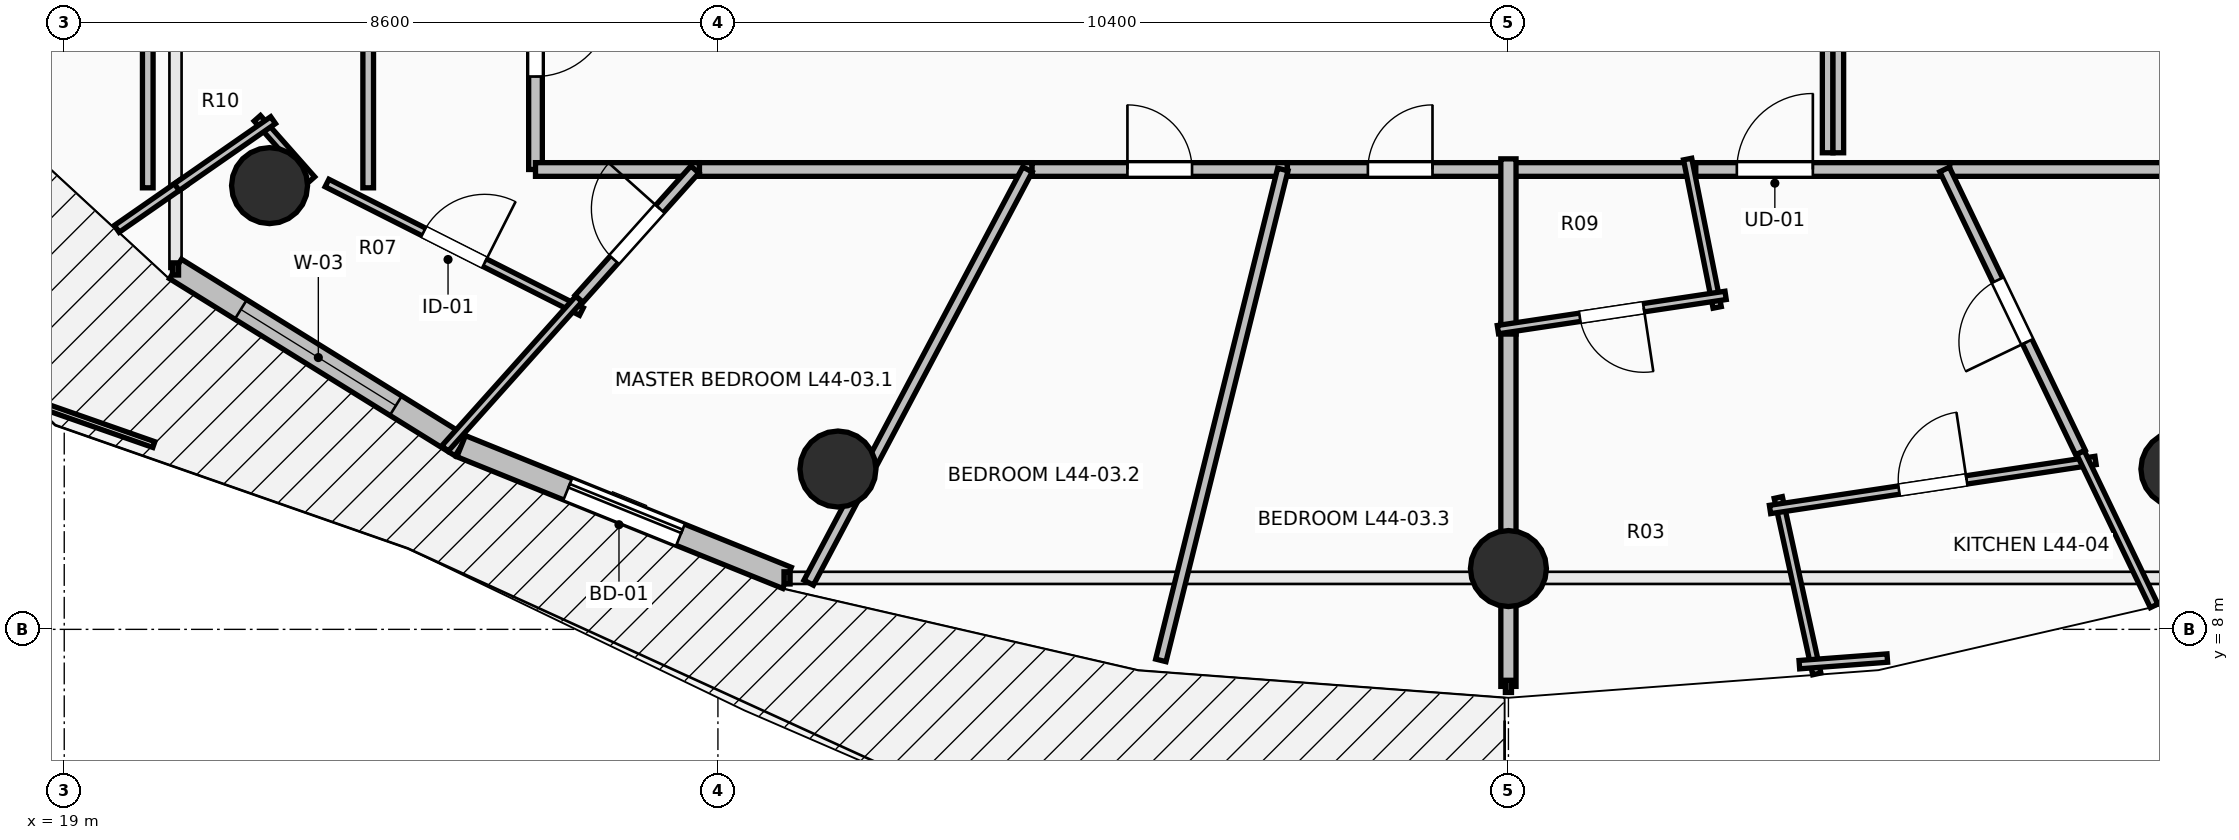
"""IFC4 building model, lengths in metres.
Left out: names, types, materials, properties, quantities, classifications, styles, units other than length and angle.
Written with IfcOpenShell. Run it as: python <this file> out.ifc"""

import sys

from ifc_helpers import new_model, si_unit, direction, frame, frame_2d, origin, origin_2d, place, context, subcontext, project, spatial, rectangle, circle, extrude, element, fill, save


model = new_model("IFC4")
c1 = context("Model", 3, precision=1e-05, world=origin(), true_north=direction((0.0, 1.0)))
c2 = subcontext(c1, "Body", "Model", "MODEL_VIEW")
j1 = project(units=[si_unit("LENGTHUNIT", "METRE"), si_unit("PLANEANGLEUNIT", "RADIAN")], contexts=[c1])
p1 = place(None, origin())
s1 = spatial("IfcSite", under=j1, at=p1, CompositionType="ELEMENT")
p2 = place(p1, origin())
s2 = spatial("IfcBuilding", under=s1, at=p2, CompositionType="ELEMENT")
p3 = place(p2, frame((0.0, 0.0, 164.1)))
s3 = spatial("IfcBuildingStorey", under=s2, at=p3, CompositionType="ELEMENT", Elevation=164.1)
for number, where, z_axis, x_axis in (
    (1, (21.701, 13.838, 0.0), (0.0, 0.0, 1.0), (-0.707, -0.707, 0.0)),
    (2, (29.179, 10.109, 0.0), (0.0, 0.0, 1.0), (-0.383, -0.924, 0.0)),
    (3, (38.0, 8.8, 0.0), (0.0, 0.0, 1.0), (0.0, -1.0, 0.0)),
    (4, (46.821, 10.109, 0.0), (0.0, 0.0, 1.0), (0.383, -0.924, 0.0)),
):
    element("IfcColumn", number, at=place(p3, frame(where, z_axis=z_axis, x_axis=x_axis)), inside=s3, PredefinedType="COLUMN", context=c2, shape_type="SweptSolid", body=[
        extrude(circle(Radius=0.5, at=origin_2d()), origin(), (0.0, 0.0, 1.0), 3.5),
    ])
p4 = place(p3, frame((20.464, 12.742, 0.0), z_axis=(0.0, 0.0, 1.0), x_axis=(0.849721181976, -0.527232313977, 0.0)))
e5 = element("IfcWall", 5, at=p4, inside=s3, PredefinedType="STANDARD", context=c2, shape_type="SweptSolid", body=[
    extrude(rectangle(XDim=4.423, YDim=0.3, at=frame_2d((2.211, 0.0))), origin(), (0.0, 0.0, 1.0), 3.24),
])
p5 = place(p4, frame((1.011, 0.0, 0.85)))
e6 = element("IfcOpeningElement", 6, at=p5, cuts=e5, PredefinedType="OPENING", context=c2, shape_type="SweptSolid", body=[
    extrude(rectangle(XDim=2.4, YDim=2.19, at=frame_2d((1.2, 1.095))), frame((0.0, 0.165, 0.0), z_axis=(0.0, -1.0, 0.0), x_axis=(1.0, 0.0, 0.0)), (0.0, 0.0, 1.0), 0.33),
])
p6 = place(p3, frame((24.222, 10.41, 0.0), z_axis=(0.0, 0.0, 1.0), x_axis=(0.927156504392, -0.374674280359, 0.0)))
e7 = element("IfcWall", 7, at=p6, inside=s3, PredefinedType="STANDARD", context=c2, shape_type="SweptSolid", body=[
    extrude(rectangle(XDim=4.625, YDim=0.3, at=frame_2d((2.312, 0.0))), origin(), (0.0, 0.0, 1.0), 3.24),
])
p7 = place(p6, frame((1.512, 0.0, 0.0)))
e8 = element("IfcOpeningElement", 8, at=p7, cuts=e7, PredefinedType="OPENING", context=c2, shape_type="SweptSolid", body=[
    extrude(rectangle(XDim=1.6, YDim=2.3, at=frame_2d((0.8, 1.15))), frame((0.0, 0.165, 0.0), z_axis=(0.0, -1.0, 0.0), x_axis=(1.0, 0.0, 0.0)), (0.0, 0.0, 1.0), 0.33),
])
p8 = place(p3, frame((25.2, 17.496, 0.0), z_axis=(0.0, 0.0, 1.0), x_axis=(0.0, -1.0, 0.0)))
e9 = element("IfcWall", 9, at=p8, inside=s3, PredefinedType="PARTITIONING", context=c2, shape_type="SweptSolid", body=[
    extrude(rectangle(XDim=3.446, YDim=0.18, at=frame_2d((1.723, 0.0))), origin(), (0.0, 0.0, 1.0), 2.432),
])
p9 = place(p8, frame((1.223, 0.0, 0.0)))
e10 = element("IfcOpeningElement", 10, at=p9, cuts=e9, PredefinedType="OPENING", context=c2, shape_type="SweptSolid", body=[
    extrude(rectangle(XDim=1.0, YDim=2.15, at=frame_2d((0.5, 1.075))), frame((0.0, 0.105, 0.0), z_axis=(0.0, -1.0, 0.0), x_axis=(1.0, 0.0, 0.0)), (0.0, 0.0, 1.0), 0.21),
])
p10 = place(p3, frame((25.2, 14.05, 0.0), z_axis=(0.0, 0.0, 1.0), x_axis=(1.0, 0.0, 0.0)))
e11 = element("IfcWall", 11, at=p10, inside=s3, PredefinedType="PARTITIONING", context=c2, shape_type="SweptSolid", body=[
    extrude(rectangle(XDim=2.157, YDim=0.18, at=frame_2d((1.079, 0.0))), origin(), (0.0, 0.0, 1.0), 2.886),
])
p11 = place(p3, frame((27.357, 14.05, 0.0), z_axis=(0.0, 0.0, 1.0), x_axis=(1.0, 0.0, 0.0)))
e12 = element("IfcWall", 12, at=p11, inside=s3, PredefinedType="PARTITIONING", context=c2, shape_type="SweptSolid", body=[
    extrude(rectangle(XDim=4.376, YDim=0.18, at=frame_2d((2.188, 0.0))), origin(), (0.0, 0.0, 1.0), 2.432),
])
p12 = place(p3, frame((31.733, 14.05, 0.0), z_axis=(0.0, 0.0, 1.0), x_axis=(1.0, 0.0, 0.0)))
e13 = element("IfcWall", 13, at=p12, inside=s3, PredefinedType="PARTITIONING", context=c2, shape_type="SweptSolid", body=[
    extrude(rectangle(XDim=3.359, YDim=0.18, at=frame_2d((1.68, 0.0))), origin(), (0.0, 0.0, 1.0), 2.929),
])
p13 = place(p12, frame((1.254, 0.0, 0.0)))
e14 = element("IfcOpeningElement", 14, at=p13, cuts=e13, PredefinedType="OPENING", context=c2, shape_type="SweptSolid", body=[
    extrude(rectangle(XDim=0.85, YDim=2.1, at=frame_2d((0.425, 1.05))), frame((0.0, 0.105, 0.0), z_axis=(0.0, -1.0, 0.0), x_axis=(1.0, 0.0, 0.0)), (0.0, 0.0, 1.0), 0.21),
])
p14 = place(p3, frame((35.092, 14.05, 0.0), z_axis=(0.0, 0.0, 1.0), x_axis=(1.0, 0.0, 0.0)))
e15 = element("IfcWall", 15, at=p14, inside=s3, PredefinedType="PARTITIONING", context=c2, shape_type="SweptSolid", body=[
    extrude(rectangle(XDim=2.968, YDim=0.18, at=frame_2d((1.484, 0.0))), origin(), (0.0, 0.0, 1.0), 2.929),
])
p15 = place(p14, frame((1.059, 0.0, 0.0)))
e16 = element("IfcOpeningElement", 16, at=p15, cuts=e15, PredefinedType="OPENING", context=c2, shape_type="SweptSolid", body=[
    extrude(rectangle(XDim=0.85, YDim=2.1, at=frame_2d((0.425, 1.05))), frame((0.0, 0.105, 0.0), z_axis=(0.0, -1.0, 0.0), x_axis=(1.0, 0.0, 0.0)), (0.0, 0.0, 1.0), 0.21),
])
p16 = place(p3, frame((40.325, 14.05, 0.0), z_axis=(0.0, 0.0, 1.0), x_axis=(1.0, 0.0, 0.0)))
e17 = element("IfcWall", 17, at=p16, inside=s3, PredefinedType="PARTITIONING", context=c2, shape_type="SweptSolid", body=[
    extrude(rectangle(XDim=3.48, YDim=0.18, at=frame_2d((1.74, 0.0))), origin(), (0.0, 0.0, 1.0), 3.24),
])
p17 = place(p16, frame((0.68, 0.0, 0.0)))
e18 = element("IfcOpeningElement", 18, at=p17, cuts=e17, PredefinedType="OPENING", context=c2, shape_type="SweptSolid", body=[
    extrude(rectangle(XDim=1.0, YDim=2.15, at=frame_2d((0.5, 1.075))), frame((0.0, 0.105, 0.0), z_axis=(0.0, -1.0, 0.0), x_axis=(1.0, 0.0, 0.0)), (0.0, 0.0, 1.0), 0.21),
])
p18 = place(p3, frame((37.92, 14.05, 0.0), z_axis=(0.0, 0.0, 1.0), x_axis=(1.0, 0.0, 0.0)))
e19 = element("IfcWall", 19, at=p18, inside=s3, PredefinedType="PARTITIONING", context=c2, shape_type="SweptSolid", body=[
    extrude(rectangle(XDim=2.545, YDim=0.18, at=frame_2d((1.272, 0.0))), origin(), (0.0, 0.0, 1.0), 2.929),
])
p19 = place(p3, frame((43.805, 14.05, 0.0), z_axis=(0.0, 0.0, 1.0), x_axis=(1.0, 0.0, 0.0)))
e20 = element("IfcWall", 20, at=p19, inside=s3, PredefinedType="PARTITIONING", context=c2, shape_type="SweptSolid", body=[
    extrude(rectangle(XDim=2.987, YDim=0.18, at=frame_2d((1.494, 0.0))), origin(), (0.0, 0.0, 1.0), 2.432),
])
p20 = place(p3, frame((22.457, 13.872, 0.0), z_axis=(0.0, 0.0, 1.0), x_axis=(0.892531160695, -0.450985728364, 0.0)))
e21 = element("IfcWall", 21, at=p20, inside=s3, PredefinedType="PARTITIONING", context=c2, shape_type="SweptSolid", body=[
    extrude(rectangle(XDim=3.75, YDim=0.11, at=frame_2d((1.875, 0.0))), origin(), (0.0, 0.0, 1.0), 3.24),
])
p21 = place(p20, frame((1.425, 0.0, 0.0)))
e22 = element("IfcOpeningElement", 22, at=p21, cuts=e21, PredefinedType="OPENING", context=c2, shape_type="SweptSolid", body=[
    extrude(rectangle(XDim=0.9, YDim=2.1, at=frame_2d((0.45, 1.05))), frame((0.0, 0.07, 0.0), z_axis=(0.0, -1.0, 0.0), x_axis=(1.0, 0.0, 0.0)), (0.0, 0.0, 1.0), 0.14),
])
p22 = place(p3, frame((25.772, 12.348, 0.0), z_axis=(0.0, 0.0, 1.0), x_axis=(-0.667094551448, -0.744973059532, 0.0)))
e23 = element("IfcWall", 23, at=p22, inside=s3, PredefinedType="PARTITIONING", context=c2, shape_type="SweptSolid", body=[
    extrude(rectangle(XDim=2.643, YDim=0.11, at=frame_2d((1.321, 0.0))), origin(), (0.0, 0.0, 1.0), 2.728),
])
p23 = place(p3, frame((19.691, 13.269, 0.0), z_axis=(0.0, 0.0, 1.0), x_axis=(0.821239462259, 0.57058368854, 0.0)))
e24 = element("IfcWall", 24, at=p23, inside=s3, PredefinedType="PARTITIONING", context=c2, shape_type="SweptSolid", body=[
    extrude(rectangle(XDim=1.071, YDim=0.11, at=frame_2d((0.536, 0.0))), origin(), (0.0, 0.0, 1.0), 3.24),
])
p24 = place(p3, frame((20.099, 13.809, 0.0), z_axis=(0.0, 0.0, 1.0), x_axis=(0.0, 1.0, 0.0)))
e25 = element("IfcWall", 25, at=p24, inside=s3, PredefinedType="PARTITIONING", context=c2, shape_type="SweptSolid", body=[
    extrude(rectangle(XDim=2.6, YDim=0.14, at=frame_2d((1.3, 0.0))), origin(), (0.0, 0.0, 1.0), 2.728),
])
p25 = place(p3, frame((22.999, 16.409, 0.0), z_axis=(0.0, 0.0, 1.0), x_axis=(0.0, -1.0, 0.0)))
e26 = element("IfcWall", 26, at=p25, inside=s3, PredefinedType="PARTITIONING", context=c2, shape_type="SweptSolid", body=[
    extrude(rectangle(XDim=2.6, YDim=0.14, at=frame_2d((1.3, 0.0))), origin(), (0.0, 0.0, 1.0), 2.432),
])
p26 = place(p3, frame((25.773, 12.348, 0.0), z_axis=(0.0, 0.0, 1.0), x_axis=(0.667197684579, 0.744880694939, 0.0)))
e27 = element("IfcWall", 27, at=p26, inside=s3, PredefinedType="PARTITIONING", context=c2, shape_type="SweptSolid", body=[
    extrude(rectangle(XDim=2.285, YDim=0.14, at=frame_2d((1.143, 0.0))), origin(), (0.0, 0.0, 1.0), 2.886),
])
p27 = place(p26, frame((0.692, 0.0, 0.0)))
e28 = element("IfcOpeningElement", 28, at=p27, cuts=e27, PredefinedType="OPENING", context=c2, shape_type="SweptSolid", body=[
    extrude(rectangle(XDim=0.9, YDim=2.1, at=frame_2d((0.45, 1.05))), frame((0.0, 0.085, 0.0), z_axis=(0.0, -1.0, 0.0), x_axis=(1.0, 0.0, 0.0)), (0.0, 0.0, 1.0), 0.17),
])
p28 = place(p3, frame((22.254, 13.917, 0.0), z_axis=(0.0, 0.0, 1.0), x_axis=(-0.662363540736, 0.749182581154, 0.0)))
e29 = element("IfcWall", 29, at=p28, inside=s3, PredefinedType="PARTITIONING", context=c2, shape_type="SweptSolid", body=[
    extrude(rectangle(XDim=1.077, YDim=0.11, at=frame_2d((0.539, 0.0))), origin(), (0.0, 0.0, 1.0), 2.432),
])
p29 = place(p3, frame((21.748, 14.699, 0.0), z_axis=(0.0, 0.0, 1.0), x_axis=(-0.821040550937, -0.570869874592, 0.0)))
e30 = element("IfcWall", 30, at=p29, inside=s3, PredefinedType="PARTITIONING", context=c2, shape_type="SweptSolid", body=[
    extrude(rectangle(XDim=1.544, YDim=0.11, at=frame_2d((0.772, 0.0))), origin(), (0.0, 0.0, 1.0), 2.728),
])
p30 = place(p3, frame((28.794, 8.614, 0.0), z_axis=(0.0, 0.0, 1.0), x_axis=(0.468046359573, 0.883703912682, 0.0)))
e31 = element("IfcWall", 31, at=p30, inside=s3, PredefinedType="PARTITIONING", context=c2, shape_type="SweptSolid", body=[
    extrude(rectangle(XDim=6.151, YDim=0.14, at=frame_2d((3.076, 0.0))), origin(), (0.0, 0.0, 1.0), 2.728),
])
p31 = place(p3, frame((33.427, 7.592, 0.0), z_axis=(0.0, 0.0, 1.0), x_axis=(0.241188715884, 0.970478234341, 0.0)))
e32 = element("IfcWall", 32, at=p31, inside=s3, PredefinedType="PARTITIONING", context=c2, shape_type="SweptSolid", body=[
    extrude(rectangle(XDim=6.655, YDim=0.14, at=frame_2d((3.327, 0.0))), origin(), (0.0, 0.0, 1.0), 2.728),
])
p32 = place(p3, frame((38.0, 7.25, 0.0), z_axis=(0.0, 0.0, 1.0), x_axis=(0.0, 1.0, 0.0)))
e33 = element("IfcWall", 33, at=p32, inside=s3, PredefinedType="PARTITIONING", context=c2, shape_type="SweptSolid", body=[
    extrude(rectangle(XDim=4.775, YDim=0.2, at=frame_2d((2.387, 0.0))), origin(), (0.0, 0.0, 1.0), 2.886),
])
p33 = place(p3, frame((38.0, 11.885, 0.0), z_axis=(0.0, 0.0, 1.0), x_axis=(0.0, 1.0, 0.0)))
e34 = element("IfcWall", 34, at=p33, inside=s3, PredefinedType="PARTITIONING", context=c2, shape_type="SweptSolid", body=[
    extrude(rectangle(XDim=2.305, YDim=0.2, at=frame_2d((1.152, 0.0))), origin(), (0.0, 0.0, 1.0), 2.929),
])
p34 = place(p3, frame((40.358, 14.187, 0.0), z_axis=(0.0, 0.0, 1.0), x_axis=(0.195313900905, -0.980740781304, 0.0)))
e35 = element("IfcWall", 35, at=p34, inside=s3, PredefinedType="PARTITIONING", context=c2, shape_type="SweptSolid", body=[
    extrude(rectangle(XDim=1.99, YDim=0.11, at=frame_2d((0.995, 0.0))), origin(), (0.0, 0.0, 1.0), 2.929),
])
p35 = place(p3, frame((40.857, 12.394, 0.0), z_axis=(0.0, 0.0, 1.0), x_axis=(-0.988873015636, -0.148762088409, 0.0)))
e36 = element("IfcWall", 36, at=p35, inside=s3, PredefinedType="PARTITIONING", context=c2, shape_type="SweptSolid", body=[
    extrude(rectangle(XDim=3.03, YDim=0.11, at=frame_2d((1.515, 0.0))), origin(), (0.0, 0.0, 1.0), 3.24),
])
p36 = place(p35, frame((1.09, 0.0, 0.0)))
e37 = element("IfcOpeningElement", 37, at=p36, cuts=e36, PredefinedType="OPENING", context=c2, shape_type="SweptSolid", body=[
    extrude(rectangle(XDim=0.85, YDim=2.1, at=frame_2d((0.425, 1.05))), frame((0.0, 0.07, 0.0), z_axis=(0.0, -1.0, 0.0), x_axis=(1.0, 0.0, 0.0)), (0.0, 0.0, 1.0), 0.14),
])
p37 = place(p3, frame((42.057, 7.414, 0.0), z_axis=(0.0, 0.0, 1.0), x_axis=(-0.213381137421, 0.976969032361, 0.0)))
e38 = element("IfcWall", 38, at=p37, inside=s3, PredefinedType="PARTITIONING", context=c2, shape_type="SweptSolid", body=[
    extrude(rectangle(XDim=2.375, YDim=0.11, at=frame_2d((1.188, 0.0))), origin(), (0.0, 0.0, 1.0), 2.728),
])
p38 = place(p3, frame((41.442, 9.577, 0.0), z_axis=(0.0, 0.0, 1.0), x_axis=(0.988864290865, 0.148820073417, 0.0)))
e39 = element("IfcWall", 39, at=p38, inside=s3, PredefinedType="PARTITIONING", context=c2, shape_type="SweptSolid", body=[
    extrude(rectangle(XDim=4.331, YDim=0.11, at=frame_2d((2.166, 0.0))), origin(), (0.0, 0.0, 1.0), 3.24),
])
p39 = place(p38, frame((1.716, 0.0, 0.0)))
e40 = element("IfcOpeningElement", 40, at=p39, cuts=e39, PredefinedType="OPENING", context=c2, shape_type="SweptSolid", body=[
    extrude(rectangle(XDim=0.9, YDim=2.1, at=frame_2d((0.45, 1.05))), frame((0.0, 0.07, 0.0), z_axis=(0.0, -1.0, 0.0), x_axis=(1.0, 0.0, 0.0)), (0.0, 0.0, 1.0), 0.14),
])
p40 = place(p3, frame((45.525, 10.327, 0.0), z_axis=(0.0, 0.0, 1.0), x_axis=(0.433064390328, -0.901362986721, 0.0)))
e41 = element("IfcWall", 41, at=p40, inside=s3, PredefinedType="PARTITIONING", context=c2, shape_type="SweptSolid", body=[
    extrude(rectangle(XDim=2.238, YDim=0.11, at=frame_2d((1.119, 0.0))), origin(), (0.0, 0.0, 1.0), 2.728),
])
p41 = place(p3, frame((41.827, 7.535, 0.0), z_axis=(0.0, 0.0, 1.0), x_axis=(0.997175725754, 0.07510374137, 0.0)))
e42 = element("IfcWall", 42, at=p41, inside=s3, PredefinedType="PARTITIONING", context=c2, shape_type="SweptSolid", body=[
    extrude(rectangle(XDim=1.16, YDim=0.11, at=frame_2d((0.58, 0.0))), origin(), (0.0, 0.0, 1.0), 3.24),
])
p42 = place(p3, frame((45.526, 10.327, 0.0), z_axis=(0.0, 0.0, 1.0), x_axis=(-0.432873287366, 0.90145477817, 0.0)))
e43 = element("IfcWall", 43, at=p42, inside=s3, PredefinedType="PARTITIONING", context=c2, shape_type="SweptSolid", body=[
    extrude(rectangle(XDim=4.13, YDim=0.14, at=frame_2d((2.065, 0.0))), origin(), (0.0, 0.0, 1.0), 2.432),
])
p43 = place(p42, frame((1.615, 0.0, 0.0)))
e44 = element("IfcOpeningElement", 44, at=p43, cuts=e43, PredefinedType="OPENING", context=c2, shape_type="SweptSolid", body=[
    extrude(rectangle(XDim=0.9, YDim=2.1, at=frame_2d((0.45, 1.05))), frame((0.0, 0.085, 0.0), z_axis=(0.0, -1.0, 0.0), x_axis=(1.0, 0.0, 0.0)), (0.0, 0.0, 1.0), 0.17),
])
for number, where, z_axis, x_axis in (
    (45, (42.2, 16.1, 0.0), (0.0, 0.0, 1.0), (0.0, -1.0, 0.0)),
    (46, (42.34, 14.27, 0.0), (0.0, 0.0, 1.0), (0.0, 1.0, 0.0)),
):
    element("IfcWall", number, at=place(p3, frame(where, z_axis=z_axis, x_axis=x_axis)), inside=s3, PredefinedType="PARTITIONING", context=c2, shape_type="SweptSolid", body=[
        extrude(rectangle(XDim=1.83, YDim=0.14, at=frame_2d((0.915, 0.0))), origin(), (0.0, 0.0, 1.0), 3.24),
    ])
p44 = place(p7, origin())
e47 = element("IfcDoor", 47, at=p44, inside=s3, OperationType="SLIDING_TO_LEFT", PredefinedType="DOOR", context=c2, shape_type="SweptSolid", body=[
    extrude(rectangle(XDim=1.6, YDim=2.3, at=frame_2d((0.8, 1.15))), frame((0.0, 0.025, 0.0), z_axis=(0.0, -1.0, 0.0), x_axis=(1.0, 0.0, 0.0)), (0.0, 0.0, 1.0), 0.05),
])
fill(e8, e47)
p45 = place(p5, origin())
e48 = element("IfcWindow", 48, at=p45, inside=s3, PartitioningType="SINGLE_PANEL", PredefinedType="WINDOW", context=c2, shape_type="SweptSolid", body=[
    extrude(rectangle(XDim=2.4, YDim=2.19, at=frame_2d((1.2, 1.095))), frame((0.0, 0.03, 0.0), z_axis=(0.0, -1.0, 0.0), x_axis=(1.0, 0.0, 0.0)), (0.0, 0.0, 1.0), 0.06),
])
fill(e6, e48)
p46 = place(p9, origin())
e49 = element("IfcDoor", 49, at=p46, inside=s3, OperationType="SINGLE_SWING_LEFT", PredefinedType="DOOR", context=c2, shape_type="SweptSolid", body=[
    extrude(rectangle(XDim=1.0, YDim=2.15, at=frame_2d((0.5, 1.075))), frame((0.0, 0.025, 0.0), z_axis=(0.0, -1.0, 0.0), x_axis=(1.0, 0.0, 0.0)), (0.0, 0.0, 1.0), 0.05),
])
fill(e10, e49)
p47 = place(p17, origin())
e50 = element("IfcDoor", 50, at=p47, inside=s3, OperationType="SINGLE_SWING_RIGHT", PredefinedType="DOOR", context=c2, shape_type="SweptSolid", body=[
    extrude(rectangle(XDim=1.0, YDim=2.15, at=frame_2d((0.5, 1.075))), frame((0.0, 0.025, 0.0), z_axis=(0.0, -1.0, 0.0), x_axis=(1.0, 0.0, 0.0)), (0.0, 0.0, 1.0), 0.05),
])
fill(e18, e50)
p48 = place(p21, origin())
e51 = element("IfcDoor", 51, at=p48, inside=s3, OperationType="SINGLE_SWING_RIGHT", PredefinedType="DOOR", context=c2, shape_type="SweptSolid", body=[
    extrude(rectangle(XDim=0.9, YDim=2.1, at=frame_2d((0.45, 1.05))), frame((0.0, 0.025, 0.0), z_axis=(0.0, -1.0, 0.0), x_axis=(1.0, 0.0, 0.0)), (0.0, 0.0, 1.0), 0.05),
])
fill(e22, e51)
p49 = place(p27, origin())
e52 = element("IfcDoor", 52, at=p49, inside=s3, OperationType="SINGLE_SWING_RIGHT", PredefinedType="DOOR", context=c2, shape_type="SweptSolid", body=[
    extrude(rectangle(XDim=0.9, YDim=2.1, at=frame_2d((0.45, 1.05))), frame((0.0, 0.025, 0.0), z_axis=(0.0, -1.0, 0.0), x_axis=(1.0, 0.0, 0.0)), (0.0, 0.0, 1.0), 0.05),
])
fill(e28, e52)
p50 = place(p36, origin())
e53 = element("IfcDoor", 53, at=p50, inside=s3, OperationType="SINGLE_SWING_LEFT", PredefinedType="DOOR", context=c2, shape_type="SweptSolid", body=[
    extrude(rectangle(XDim=0.85, YDim=2.1, at=frame_2d((0.425, 1.05))), frame((0.0, 0.025, 0.0), z_axis=(0.0, -1.0, 0.0), x_axis=(1.0, 0.0, 0.0)), (0.0, 0.0, 1.0), 0.05),
])
fill(e37, e53)
p51 = place(p39, origin())
e54 = element("IfcDoor", 54, at=p51, inside=s3, OperationType="SINGLE_SWING_RIGHT", PredefinedType="DOOR", context=c2, shape_type="SweptSolid", body=[
    extrude(rectangle(XDim=0.9, YDim=2.1, at=frame_2d((0.45, 1.05))), frame((0.0, 0.025, 0.0), z_axis=(0.0, -1.0, 0.0), x_axis=(1.0, 0.0, 0.0)), (0.0, 0.0, 1.0), 0.05),
])
fill(e40, e54)
p52 = place(p43, origin())
e55 = element("IfcDoor", 55, at=p52, inside=s3, OperationType="SINGLE_SWING_LEFT", PredefinedType="DOOR", context=c2, shape_type="SweptSolid", body=[
    extrude(rectangle(XDim=0.9, YDim=2.1, at=frame_2d((0.45, 1.05))), frame((0.0, 0.025, 0.0), z_axis=(0.0, -1.0, 0.0), x_axis=(1.0, 0.0, 0.0)), (0.0, 0.0, 1.0), 0.05),
])
fill(e44, e55)
p53 = place(p13, origin())
e56 = element("IfcDoor", 56, at=p53, inside=s3, OperationType="SINGLE_SWING_LEFT", PredefinedType="DOOR", context=c2, shape_type="SweptSolid", body=[
    extrude(rectangle(XDim=0.85, YDim=2.1, at=frame_2d((0.425, 1.05))), frame((0.0, 0.025, 0.0), z_axis=(0.0, -1.0, 0.0), x_axis=(1.0, 0.0, 0.0)), (0.0, 0.0, 1.0), 0.05),
])
fill(e14, e56)
p54 = place(p15, origin())
e57 = element("IfcDoor", 57, at=p54, inside=s3, OperationType="SINGLE_SWING_RIGHT", PredefinedType="DOOR", context=c2, shape_type="SweptSolid", body=[
    extrude(rectangle(XDim=0.85, YDim=2.1, at=frame_2d((0.425, 1.05))), frame((0.0, 0.025, 0.0), z_axis=(0.0, -1.0, 0.0), x_axis=(1.0, 0.0, 0.0)), (0.0, 0.0, 1.0), 0.05),
])
fill(e16, e57)
save(model, sys.argv[1])
